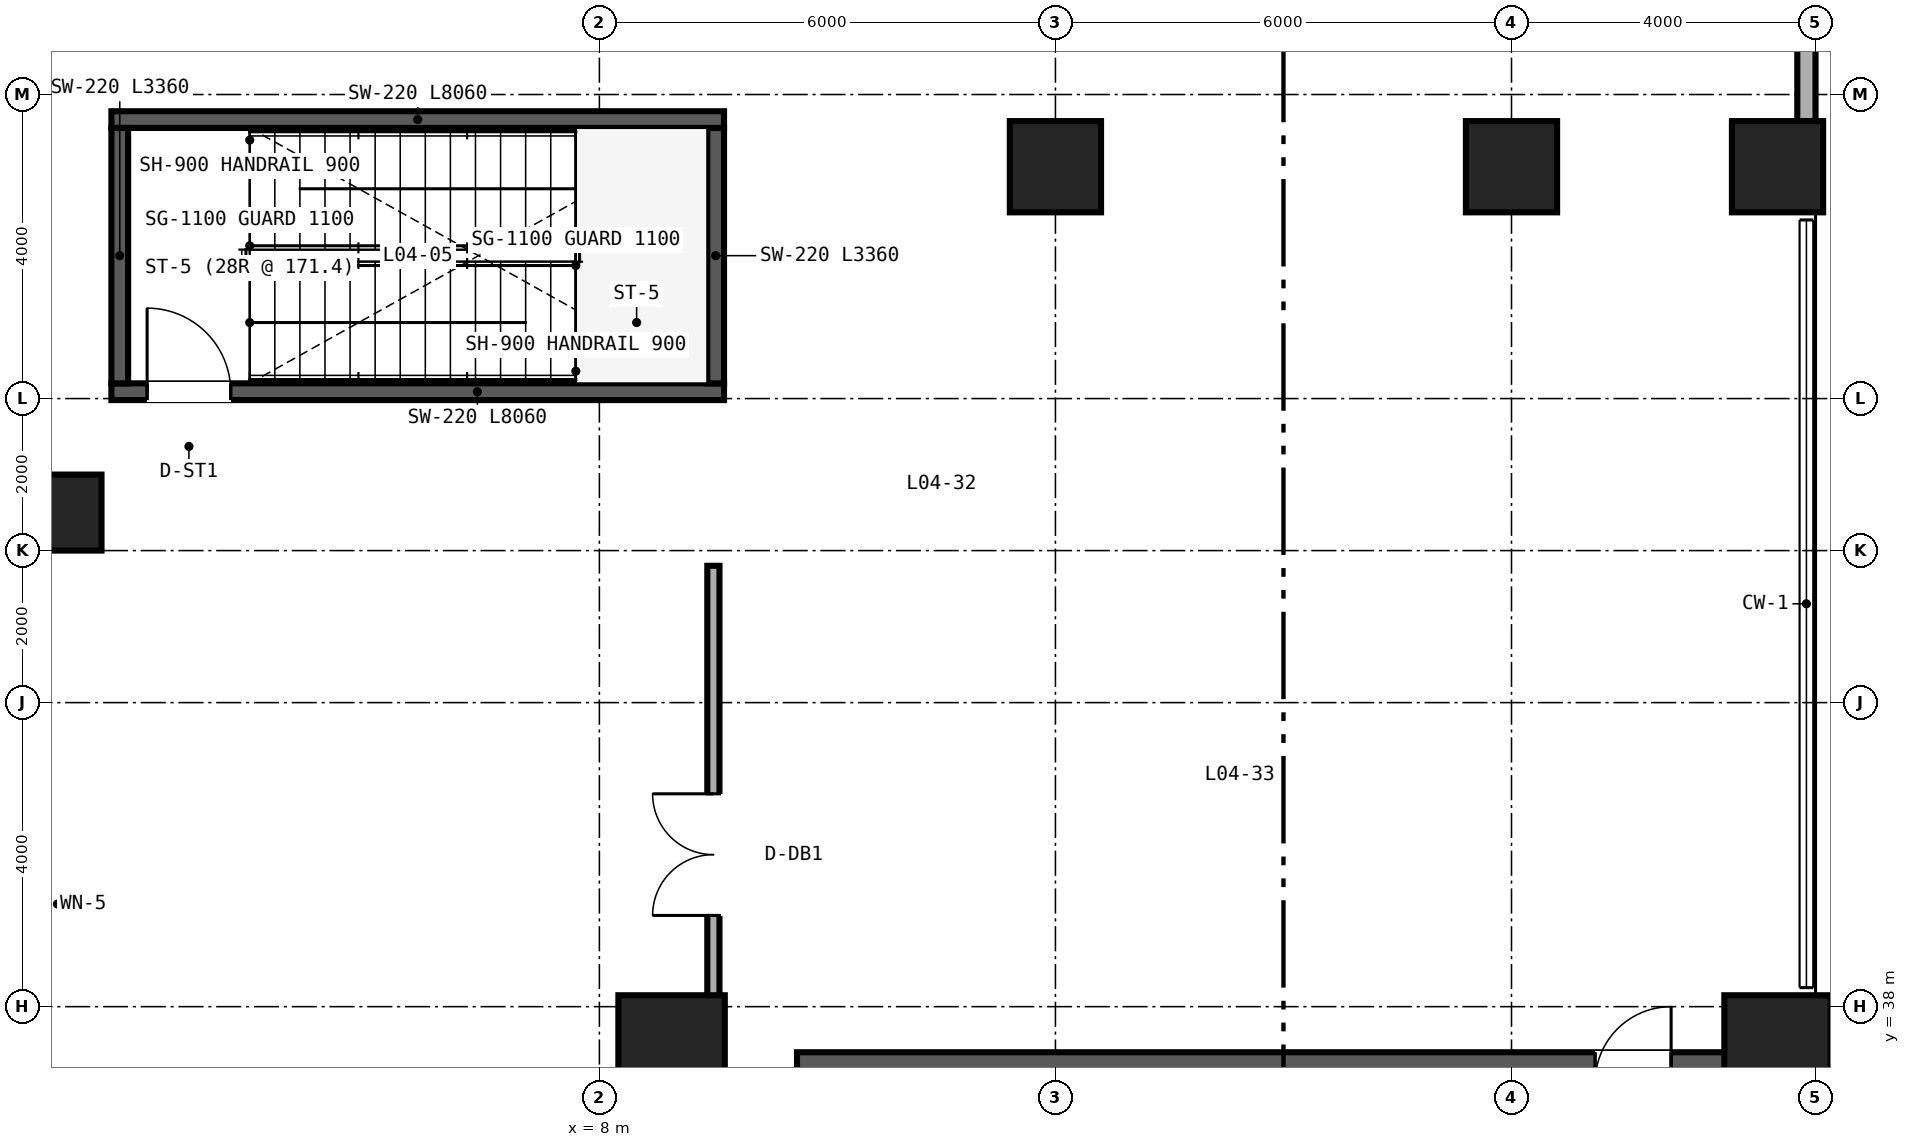
"""IFC4 building model, lengths in metres.
Left out: names, types, materials, properties, quantities, classifications, styles, units other than length and angle.
Written with IfcOpenShell. Run it as: python <this file> out.ifc"""

import sys

from ifc_helpers import new_model, si_unit, direction, frame, frame_2d, origin, origin_2d, place, context, subcontext, project, spatial, rectangle, extrude, source, transform, mapped, element, fill, save


model = new_model("IFC4")
c1 = context("Model", 3, precision=1e-05, world=origin(), true_north=direction((0.0, 1.0)))
c2 = subcontext(c1, "Body", "Model", "MODEL_VIEW")
j1 = project(units=[si_unit("LENGTHUNIT", "METRE"), si_unit("PLANEANGLEUNIT", "RADIAN")], contexts=[c1])
p1 = place(None, origin())
s1 = spatial("IfcSite", under=j1, at=p1, CompositionType="ELEMENT")
p2 = place(p1, origin())
s2 = spatial("IfcBuilding", under=s1, at=p2, CompositionType="ELEMENT")
p3 = place(p2, frame((0.0, 0.0, 19.2)))
s3 = spatial("IfcBuildingStorey", under=s2, at=p3, CompositionType="ELEMENT", Elevation=19.2)
p4 = place(p3, frame((10.6, 37.0, 0.0), z_axis=(0.0, 0.0, 1.0), x_axis=(1.0, 0.0, 0.0)))
e1 = element("IfcWall", 1, at=p4, inside=s3, PredefinedType="SHEAR", context=c2, shape_type="SweptSolid", body=[
    extrude(rectangle(XDim=12.8, YDim=0.8, at=frame_2d((6.4, 0.0))), origin(), (0.0, 0.0, 1.0), 4.48),
])
p5 = place(p4, frame((10.5, 0.0, 0.0)))
e2 = element("IfcOpeningElement", 2, at=p5, cuts=e1, PredefinedType="OPENING", context=c2, shape_type="SweptSolid", body=[
    extrude(rectangle(XDim=1.0, YDim=2.15, at=frame_2d((0.5, 1.075))), frame((0.0, 0.41, 0.0), z_axis=(0.0, -1.0, 0.0), x_axis=(1.0, 0.0, 0.0)), (0.0, 0.0, 1.0), 0.82),
])
p6 = place(p3, frame((1.58, 46.09, 0.0), z_axis=(0.0, 0.0, 1.0), x_axis=(1.0, 0.0, 0.0)))
e3 = element("IfcWall", 3, at=p6, inside=s3, PredefinedType="SHEAR", context=c2, shape_type="SweptSolid", body=[
    extrude(rectangle(XDim=8.06, YDim=0.22, at=frame_2d((4.03, 0.0))), origin(), (0.0, 0.0, 1.0), 4.6),
])
p7 = place(p6, frame((0.47, 0.0, 0.0)))
e4 = element("IfcOpeningElement", 4, at=p7, cuts=e3, PredefinedType="OPENING", context=c2, shape_type="SweptSolid", body=[
    extrude(rectangle(XDim=1.1, YDim=2.15, at=frame_2d((0.55, 1.075))), frame((0.0, 0.12, 0.0), z_axis=(0.0, -1.0, 0.0), x_axis=(1.0, 0.0, 0.0)), (0.0, 0.0, 1.0), 0.24),
])
p8 = place(p3, frame((1.58, 49.67, 0.0), z_axis=(0.0, 0.0, 1.0), x_axis=(1.0, 0.0, 0.0)))
e5 = element("IfcWall", 5, at=p8, inside=s3, PredefinedType="SHEAR", context=c2, shape_type="SweptSolid", body=[
    extrude(rectangle(XDim=8.06, YDim=0.22, at=frame_2d((4.03, 0.0))), origin(), (0.0, 0.0, 1.0), 4.6),
])
for number, where, z_axis, x_axis in (
    (6, (1.69, 46.2, 0.0), (0.0, 0.0, 1.0), (0.0, 1.0, 0.0)),
    (7, (9.53, 46.2, 0.0), (0.0, 0.0, 1.0), (0.0, 1.0, 0.0)),
):
    element("IfcWall", number, at=place(p3, frame(where, z_axis=z_axis, x_axis=x_axis)), inside=s3, PredefinedType="SHEAR", context=c2, shape_type="SweptSolid", body=[
        extrude(rectangle(XDim=3.36, YDim=0.22, at=frame_2d((1.68, 0.0))), origin(), (0.0, 0.0, 1.0), 4.6),
    ])
m1 = source(origin(), c2, "Body", "SweptSolid", [
    extrude(rectangle(XDim=1.0, YDim=1.0, at=origin_2d()), origin(), (0.0, 0.0, 1.0), 4.48),
])
p9 = place(p3, frame((0.95, 44.5, 0.0), z_axis=(0.0, 0.0, 1.0), x_axis=(1.0, 0.0, 0.0)))
e8 = element("IfcColumn", 8, at=p9, inside=s3, PredefinedType="COLUMN", context=c2, shape_type="MappedRepresentation", body=[
    mapped(m1, transform((0.0, 0.0, 0.0), scale=1.0)),
])
m2 = source(origin(), c2, "Body", "SweptSolid", [
    extrude(rectangle(XDim=1.4, YDim=1.4, at=origin_2d()), origin(), (0.0, 0.0, 1.0), 4.48),
])
for number, where, z_axis, x_axis in (
    (9, (8.95, 37.45, 0.0), (0.0, 0.0, 1.0), (1.0, 0.0, 0.0)),
    (10, (23.5, 37.45, 0.0), (0.0, 0.0, 1.0), (1.0, 0.0, 0.0)),
):
    element("IfcColumn", number, at=place(p3, frame(where, z_axis=z_axis, x_axis=x_axis)), inside=s3, PredefinedType="COLUMN", context=c2, shape_type="MappedRepresentation", body=[
        mapped(m2, transform((0.0, 0.0, 0.0), scale=1.0)),
    ])
m3 = source(origin(), c2, "Body", "SweptSolid", [
    extrude(rectangle(XDim=1.2, YDim=1.2, at=origin_2d()), origin(), (0.0, 0.0, 1.0), 4.48),
])
for number, where, z_axis, x_axis in (
    (11, (14.0, 49.05, 0.0), (0.0, 0.0, 1.0), (1.0, 0.0, 0.0)),
    (12, (20.0, 49.05, 0.0), (0.0, 0.0, 1.0), (1.0, 0.0, 0.0)),
    (13, (23.5, 49.05, 0.0), (0.0, 0.0, 1.0), (1.0, 0.0, 0.0)),
):
    element("IfcColumn", number, at=place(p3, frame(where, z_axis=z_axis, x_axis=x_axis)), inside=s3, PredefinedType="COLUMN", context=c2, shape_type="MappedRepresentation", body=[
        mapped(m3, transform((0.0, 0.0, 0.0), scale=1.0)),
    ])
p10 = place(p3, frame((23.88, 49.65, 0.0), z_axis=(0.0, 0.0, 1.0), x_axis=(0.0, 1.0, 0.0)))
e14 = element("IfcWall", 14, at=p10, inside=s3, PredefinedType="SOLIDWALL", context=c2, shape_type="SweptSolid", body=[
    extrude(rectangle(XDim=2.05, YDim=0.24, at=frame_2d((1.025, 0.0))), origin(), (0.0, 0.0, 1.0), 3.532),
])
p11 = place(p3, frame((9.5, 12.2, 0.0), z_axis=(0.0, 0.0, 1.0), x_axis=(0.0, 1.0, 0.0)))
e15 = element("IfcWall", 15, at=p11, inside=s3, PredefinedType="PARTITIONING", context=c2, shape_type="SweptSolid", body=[
    extrude(rectangle(XDim=31.6, YDim=0.16, at=frame_2d((15.8, 0.0))), origin(), (0.0, 0.0, 1.0), 3.553),
])
p12 = place(p11, frame((5.0, 0.0, 0.0)))
e16 = element("IfcOpeningElement", 16, at=p12, cuts=e15, PredefinedType="OPENING", context=c2, shape_type="SweptSolid", body=[
    extrude(rectangle(XDim=1.6, YDim=2.3, at=frame_2d((0.8, 1.15))), frame((0.0, 0.09, 0.0), z_axis=(0.0, -1.0, 0.0), x_axis=(1.0, 0.0, 0.0)), (0.0, 0.0, 1.0), 0.18),
])
p13 = place(p11, frame((27.0, 0.0, 0.0)))
e17 = element("IfcOpeningElement", 17, at=p13, cuts=e15, PredefinedType="OPENING", context=c2, shape_type="SweptSolid", body=[
    extrude(rectangle(XDim=1.6, YDim=2.3, at=frame_2d((0.8, 1.15))), frame((0.0, 0.09, 0.0), z_axis=(0.0, -1.0, 0.0), x_axis=(1.0, 0.0, 0.0)), (0.0, 0.0, 1.0), 0.18),
])
m4 = source(origin(), c2, "Body", "SweptSolid", [
    extrude(rectangle(XDim=1.1, YDim=2.15, at=frame_2d((0.55, 1.075))), frame((0.0, 0.025, 0.0), z_axis=(0.0, -1.0, 0.0), x_axis=(1.0, 0.0, 0.0)), (0.0, 0.0, 1.0), 0.05),
])
p14 = place(p7, origin())
e18 = element("IfcDoor", 18, at=p14, inside=s3, OperationType="SINGLE_SWING_LEFT", PredefinedType="DOOR", context=c2, shape_type="MappedRepresentation", body=[
    mapped(m4, transform((0.0, 0.0, 0.0), scale=1.0)),
])
fill(e4, e18)
m5 = source(origin(), c2, "Body", "SweptSolid", [
    extrude(rectangle(XDim=1.6, YDim=2.3, at=frame_2d((0.8, 1.15))), frame((0.0, 0.025, 0.0), z_axis=(0.0, -1.0, 0.0), x_axis=(1.0, 0.0, 0.0)), (0.0, 0.0, 1.0), 0.05),
])
p15 = place(p13, origin())
e19 = element("IfcDoor", 19, at=p15, inside=s3, OperationType="DOUBLE_DOOR_SINGLE_SWING", PredefinedType="DOOR", context=c2, shape_type="MappedRepresentation", body=[
    mapped(m5, transform((0.0, 0.0, 0.0), scale=1.0)),
])
fill(e17, e19)
save(model, sys.argv[1])
